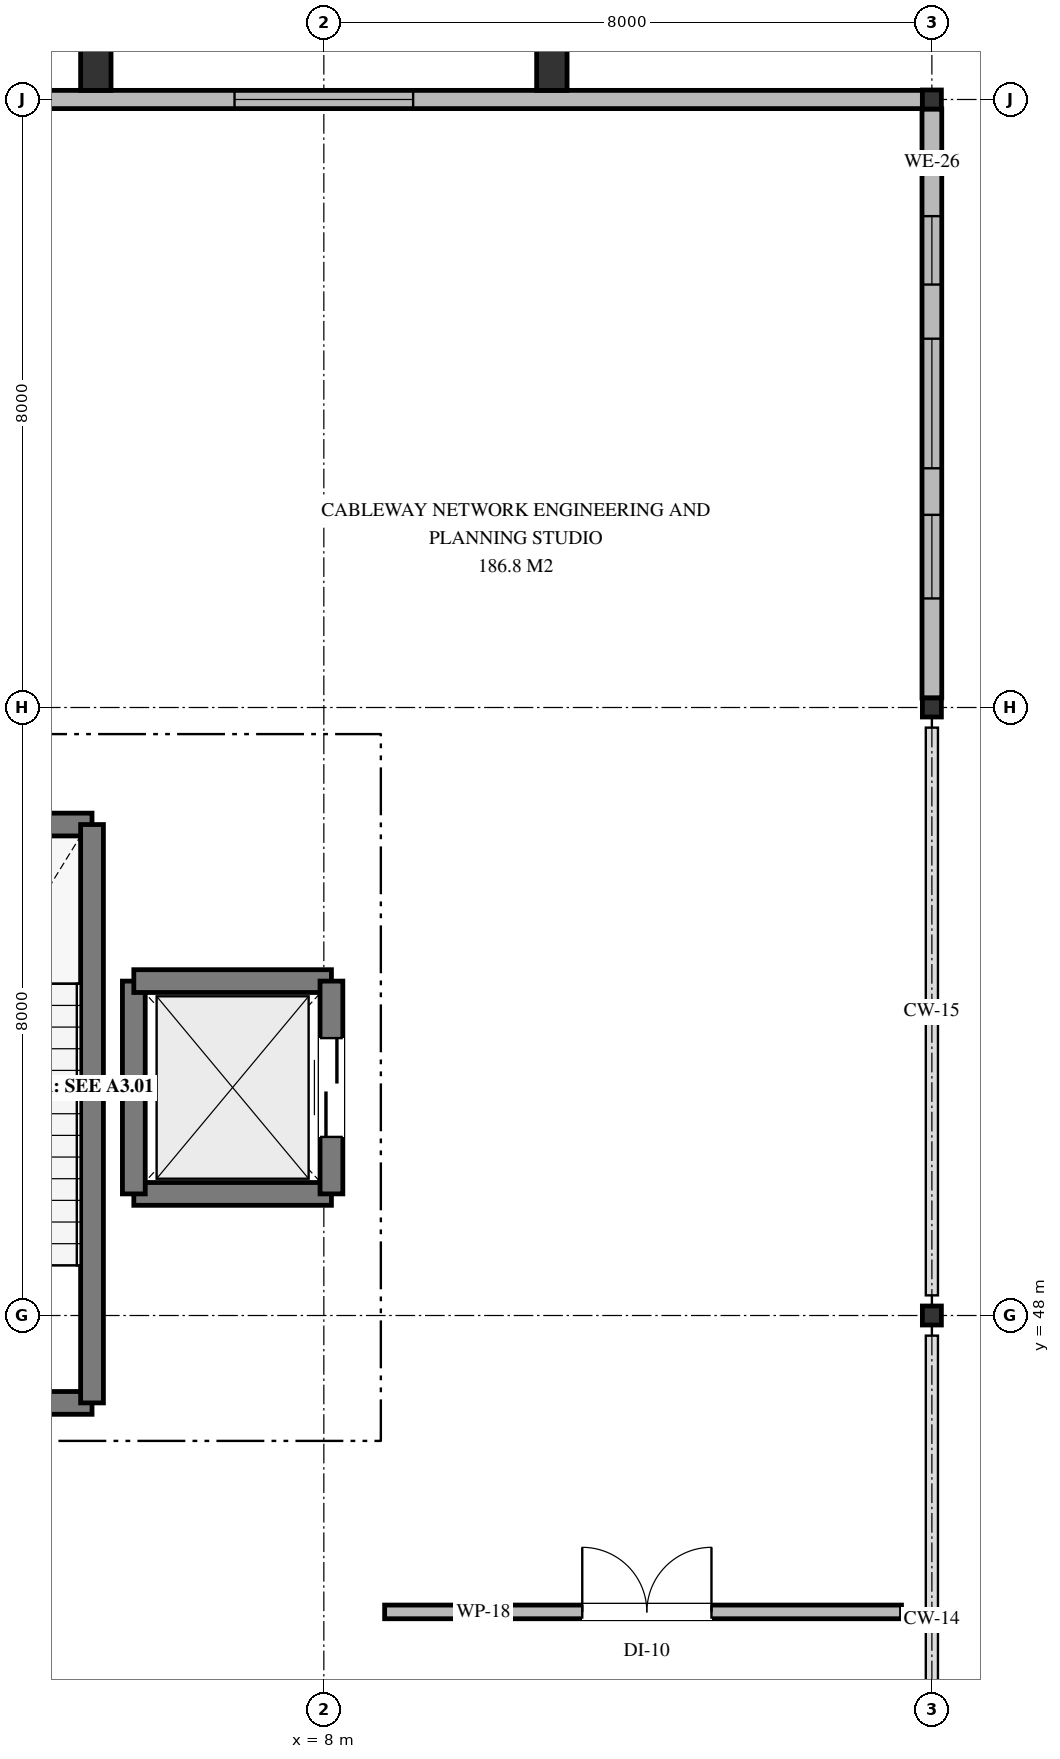
"""IFC4 building model, lengths in metres.
Left out: names, types, materials, properties, quantities, classifications, styles, units other than length and angle.
Written with IfcOpenShell. Run it as: python <this file> out.ifc"""

import sys

from ifc_helpers import new_model, si_unit, direction, frame, frame_2d, origin, origin_2d, place, context, subcontext, project, spatial, rectangle, hollow_rectangle, extrude, element, fill, save


model = new_model("IFC4")
c1 = context("Model", 3, precision=1e-05, world=origin(), true_north=direction((0.0, 1.0)))
c2 = subcontext(c1, "Body", "Model", "MODEL_VIEW")
j1 = project(units=[si_unit("LENGTHUNIT", "METRE"), si_unit("PLANEANGLEUNIT", "RADIAN")], contexts=[c1])
p1 = place(None, origin())
s1 = spatial("IfcSite", under=j1, at=p1, CompositionType="ELEMENT")
p2 = place(p1, origin())
s2 = spatial("IfcBuilding", under=s1, at=p2, CompositionType="ELEMENT")
p3 = place(p2, frame((0.0, 0.0, 15.0)))
s3 = spatial("IfcBuildingStorey", under=s2, at=p3, CompositionType="ELEMENT", Elevation=15.0)
for number, where, z_axis, x_axis in (
    (1, (16.0, 48.0, 0.0), (0.0, 0.0, 1.0), (1.0, 0.0, 0.0)),
    (2, (16.0, 56.0, 0.0), (0.0, 0.0, 1.0), (1.0, 0.0, 0.0)),
    (3, (16.0, 64.0, 0.0), (0.0, 0.0, 1.0), (1.0, 0.0, 0.0)),
):
    element("IfcColumn", number, at=place(p3, frame(where, z_axis=z_axis, x_axis=x_axis)), inside=s3, PredefinedType="COLUMN", context=c2, shape_type="SweptSolid", body=[
        extrude(hollow_rectangle(XDim=0.25, YDim=0.25, WallThickness=0.012, at=origin_2d()), origin(), (0.0, 0.0, 1.0), 4.8),
    ])
for number, where, z_axis, x_axis in (
    (4, (5.0, 64.42, 0.0), (0.0, 0.0, 1.0), (1.0, 0.0, 0.0)),
    (5, (11.0, 64.42, 0.0), (0.0, 0.0, 1.0), (1.0, 0.0, 0.0)),
):
    element("IfcColumn", number, at=place(p3, frame(where, z_axis=z_axis, x_axis=x_axis)), inside=s3, PredefinedType="PILASTER", context=c2, shape_type="SweptSolid", body=[
        extrude(rectangle(XDim=0.4, YDim=0.6, at=origin_2d()), origin(), (0.0, 0.0, 1.0), 4.8),
    ])
p4 = place(p3, frame((16.0, 63.875, 0.0), z_axis=(0.0, 0.0, 1.0), x_axis=(0.0, -1.0, 0.0)))
e6 = element("IfcWall", 6, at=p4, inside=s3, PredefinedType="STANDARD", context=c2, shape_type="SweptSolid", body=[
    extrude(rectangle(XDim=7.75, YDim=0.26, at=frame_2d((3.875, 0.0))), origin(), (0.0, 0.0, 1.0), 3.949),
])
p5 = place(p4, frame((1.41, 0.0, 0.75)))
e7 = element("IfcOpeningElement", 7, at=p5, cuts=e6, PredefinedType="OPENING", context=c2, shape_type="SweptSolid", body=[
    extrude(rectangle(XDim=0.9, YDim=2.35, at=frame_2d((0.45, 1.175))), frame((0.0, 0.14, 0.0), z_axis=(0.0, -1.0, 0.0), x_axis=(1.0, 0.0, 0.0)), (0.0, 0.0, 1.0), 0.28),
])
p6 = place(p4, frame((3.022, 0.0, 0.75)))
e8 = element("IfcOpeningElement", 8, at=p6, cuts=e6, PredefinedType="OPENING", context=c2, shape_type="SweptSolid", body=[
    extrude(rectangle(XDim=1.705, YDim=2.3, at=frame_2d((0.853, 1.15))), frame((0.0, 0.14, 0.0), z_axis=(0.0, -1.0, 0.0), x_axis=(1.0, 0.0, 0.0)), (0.0, 0.0, 1.0), 0.28),
])
p7 = place(p4, frame((5.34, 0.0, 0.75)))
e9 = element("IfcOpeningElement", 9, at=p7, cuts=e6, PredefinedType="OPENING", context=c2, shape_type="SweptSolid", body=[
    extrude(rectangle(XDim=1.1, YDim=2.2, at=frame_2d((0.55, 1.1))), frame((0.0, 0.14, 0.0), z_axis=(0.0, -1.0, 0.0), x_axis=(1.0, 0.0, 0.0)), (0.0, 0.0, 1.0), 0.28),
])
p8 = place(p3, frame((0.125, 64.0, 0.0), z_axis=(0.0, 0.0, 1.0), x_axis=(1.0, 0.0, 0.0)))
e10 = element("IfcWall", 10, at=p8, inside=s3, PredefinedType="STANDARD", context=c2, shape_type="SweptSolid", body=[
    extrude(rectangle(XDim=15.75, YDim=0.24, at=frame_2d((7.875, 0.0))), origin(), (0.0, 0.0, 1.0), 3.795),
])
p9 = place(p8, frame((6.7, 0.0, 0.75)))
e11 = element("IfcOpeningElement", 11, at=p9, cuts=e10, PredefinedType="OPENING", context=c2, shape_type="SweptSolid", body=[
    extrude(rectangle(XDim=2.35, YDim=1.95, at=frame_2d((1.175, 0.975))), frame((0.0, 0.13, 0.0), z_axis=(0.0, -1.0, 0.0), x_axis=(1.0, 0.0, 0.0)), (0.0, 0.0, 1.0), 0.26),
])
p10 = place(p3, frame((4.95, 46.85, 0.0), z_axis=(0.0, 0.0, 1.0), x_axis=(-1.0, 0.0, 0.0)))
e12 = element("IfcWall", 12, at=p10, inside=s3, PredefinedType="SHEAR", context=c2, shape_type="SweptSolid", body=[
    extrude(rectangle(XDim=3.78, YDim=0.3, at=frame_2d((1.89, 0.0))), origin(), (0.0, 0.0, 1.0), 4.56),
])
p11 = place(p10, frame((1.34, 0.0, 0.0)))
e13 = element("IfcOpeningElement", 13, at=p11, cuts=e12, PredefinedType="OPENING", context=c2, shape_type="SweptSolid", body=[
    extrude(rectangle(XDim=1.1, YDim=2.2, at=frame_2d((0.55, 1.1))), frame((0.0, 0.16, 0.0), z_axis=(0.0, -1.0, 0.0), x_axis=(1.0, 0.0, 0.0)), (0.0, 0.0, 1.0), 0.32),
])
p12 = place(p3, frame((1.17, 54.46, 0.0), z_axis=(0.0, 0.0, 1.0), x_axis=(1.0, 0.0, 0.0)))
e14 = element("IfcWall", 14, at=p12, inside=s3, PredefinedType="SHEAR", context=c2, shape_type="SweptSolid", body=[
    extrude(rectangle(XDim=3.78, YDim=0.3, at=frame_2d((1.89, 0.0))), origin(), (0.0, 0.0, 1.0), 4.56),
])
p13 = place(p3, frame((4.95, 54.46, 0.0), z_axis=(0.0, 0.0, 1.0), x_axis=(0.0, -1.0, 0.0)))
e15 = element("IfcWall", 15, at=p13, inside=s3, PredefinedType="SHEAR", context=c2, shape_type="SweptSolid", body=[
    extrude(rectangle(XDim=7.61, YDim=0.3, at=frame_2d((3.805, 0.0))), origin(), (0.0, 0.0, 1.0), 4.56),
])
p14 = place(p3, frame((8.1, 49.6, 0.0), z_axis=(0.0, 0.0, 1.0), x_axis=(-1.0, 0.0, 0.0)))
e16 = element("IfcWall", 16, at=p14, inside=s3, PredefinedType="SHEAR", context=c2, shape_type="SweptSolid", body=[
    extrude(rectangle(XDim=2.6, YDim=0.3, at=frame_2d((1.3, 0.0))), origin(), (0.0, 0.0, 1.0), 4.56),
])
p15 = place(p3, frame((5.5, 49.6, 0.0), z_axis=(0.0, 0.0, 1.0), x_axis=(0.0, 1.0, 0.0)))
e17 = element("IfcWall", 17, at=p15, inside=s3, PredefinedType="SHEAR", context=c2, shape_type="SweptSolid", body=[
    extrude(rectangle(XDim=2.8, YDim=0.3, at=frame_2d((1.4, 0.0))), origin(), (0.0, 0.0, 1.0), 4.56),
])
p16 = place(p3, frame((5.5, 52.4, 0.0), z_axis=(0.0, 0.0, 1.0), x_axis=(1.0, 0.0, 0.0)))
e18 = element("IfcWall", 18, at=p16, inside=s3, PredefinedType="SHEAR", context=c2, shape_type="SweptSolid", body=[
    extrude(rectangle(XDim=2.6, YDim=0.3, at=frame_2d((1.3, 0.0))), origin(), (0.0, 0.0, 1.0), 4.56),
])
p17 = place(p3, frame((8.1, 52.4, 0.0), z_axis=(0.0, 0.0, 1.0), x_axis=(0.0, -1.0, 0.0)))
e19 = element("IfcWall", 19, at=p17, inside=s3, PredefinedType="SHEAR", context=c2, shape_type="SweptSolid", body=[
    extrude(rectangle(XDim=2.8, YDim=0.3, at=frame_2d((1.4, 0.0))), origin(), (0.0, 0.0, 1.0), 4.56),
])
p18 = place(p17, frame((0.75, 0.0, 0.0)))
e20 = element("IfcOpeningElement", 20, at=p18, cuts=e19, PredefinedType="OPENING", context=c2, shape_type="SweptSolid", body=[
    extrude(rectangle(XDim=1.3, YDim=2.25, at=frame_2d((0.65, 1.125))), frame((0.0, 0.16, 0.0), z_axis=(0.0, -1.0, 0.0), x_axis=(1.0, 0.0, 0.0)), (0.0, 0.0, 1.0), 0.32),
])
p19 = place(p3, frame((8.8, 44.1, 0.0), z_axis=(0.0, 0.0, 1.0), x_axis=(1.0, 0.0, 0.0)))
e21 = element("IfcWall", 21, at=p19, inside=s3, PredefinedType="PARTITIONING", context=c2, shape_type="SweptSolid", body=[
    extrude(rectangle(XDim=6.8, YDim=0.18, at=frame_2d((3.4, 0.0))), origin(), (0.0, 0.0, 1.0), 4.085),
])
p20 = place(p19, frame((2.6, 0.0, 0.0)))
e22 = element("IfcOpeningElement", 22, at=p20, cuts=e21, PredefinedType="OPENING", context=c2, shape_type="SweptSolid", body=[
    extrude(rectangle(XDim=1.7, YDim=2.35, at=frame_2d((0.85, 1.175))), frame((0.0, 0.1, 0.0), z_axis=(0.0, -1.0, 0.0), x_axis=(1.0, 0.0, 0.0)), (0.0, 0.0, 1.0), 0.2),
])
p21 = place(p5, origin())
e23 = element("IfcWindow", 23, at=p21, inside=s3, PartitioningType="SINGLE_PANEL", PredefinedType="WINDOW", context=c2, shape_type="SweptSolid", body=[
    extrude(rectangle(XDim=0.9, YDim=2.35, at=frame_2d((0.45, 1.175))), frame((0.0, 0.03, 0.0), z_axis=(0.0, -1.0, 0.0), x_axis=(1.0, 0.0, 0.0)), (0.0, 0.0, 1.0), 0.06),
])
fill(e7, e23)
p22 = place(p6, origin())
e24 = element("IfcWindow", 24, at=p22, inside=s3, PartitioningType="SINGLE_PANEL", PredefinedType="WINDOW", context=c2, shape_type="SweptSolid", body=[
    extrude(rectangle(XDim=1.705, YDim=2.3, at=frame_2d((0.853, 1.15))), frame((0.0, 0.03, 0.0), z_axis=(0.0, -1.0, 0.0), x_axis=(1.0, 0.0, 0.0)), (0.0, 0.0, 1.0), 0.06),
])
fill(e8, e24)
p23 = place(p7, origin())
e25 = element("IfcWindow", 25, at=p23, inside=s3, PartitioningType="SINGLE_PANEL", PredefinedType="WINDOW", context=c2, shape_type="SweptSolid", body=[
    extrude(rectangle(XDim=1.1, YDim=2.2, at=frame_2d((0.55, 1.1))), frame((0.0, 0.03, 0.0), z_axis=(0.0, -1.0, 0.0), x_axis=(1.0, 0.0, 0.0)), (0.0, 0.0, 1.0), 0.06),
])
fill(e9, e25)
p24 = place(p9, origin())
e26 = element("IfcWindow", 26, at=p24, inside=s3, PartitioningType="SINGLE_PANEL", PredefinedType="WINDOW", context=c2, shape_type="SweptSolid", body=[
    extrude(rectangle(XDim=2.35, YDim=1.95, at=frame_2d((1.175, 0.975))), frame((0.0, 0.03, 0.0), z_axis=(0.0, -1.0, 0.0), x_axis=(1.0, 0.0, 0.0)), (0.0, 0.0, 1.0), 0.06),
])
fill(e11, e26)
p25 = place(p18, origin())
e27 = element("IfcDoor", 27, at=p25, inside=s3, OperationType="DOUBLE_DOOR_SLIDING", PredefinedType="DOOR", context=c2, shape_type="SweptSolid", body=[
    extrude(rectangle(XDim=1.3, YDim=2.25, at=frame_2d((0.65, 1.125))), frame((0.0, 0.025, 0.0), z_axis=(0.0, -1.0, 0.0), x_axis=(1.0, 0.0, 0.0)), (0.0, 0.0, 1.0), 0.05),
])
fill(e20, e27)
p26 = place(p20, origin())
e28 = element("IfcDoor", 28, at=p26, inside=s3, OperationType="DOUBLE_DOOR_SINGLE_SWING", PredefinedType="DOOR", context=c2, shape_type="SweptSolid", body=[
    extrude(rectangle(XDim=1.7, YDim=2.35, at=frame_2d((0.85, 1.175))), frame((0.0, 0.025, 0.0), z_axis=(0.0, -1.0, 0.0), x_axis=(1.0, 0.0, 0.0)), (0.0, 0.0, 1.0), 0.05),
])
fill(e22, e28)
save(model, sys.argv[1])
